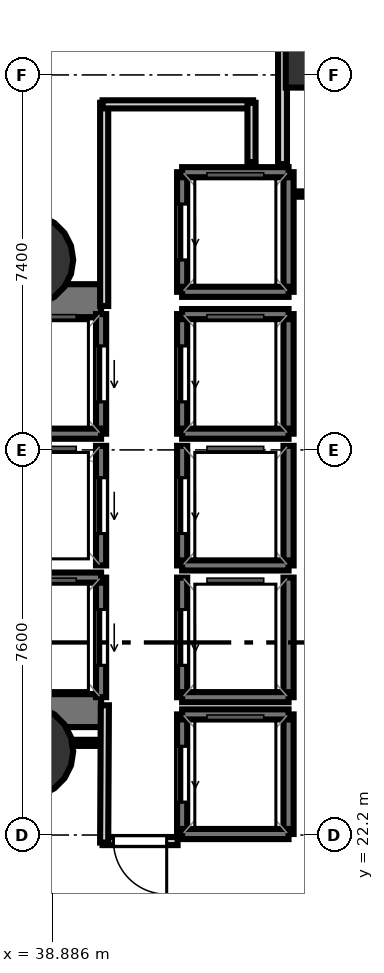
"""IFC4 building model, lengths in metres.
Left out: names, types, materials, properties, quantities, classifications, styles, units other than length and angle.
Written with IfcOpenShell. Run it as: python <this file> out.ifc"""

import sys

from ifc_helpers import new_model, si_unit, direction, frame, frame_2d, origin, origin_2d, place, context, subcontext, project, spatial, rectangle, hollow_circle, extrude, element, fill, save


model = new_model("IFC4")
c1 = context("Model", 3, precision=1e-05, world=origin(), true_north=direction((0.0, 1.0)))
c2 = subcontext(c1, "Body", "Model", "MODEL_VIEW")
j1 = project(units=[si_unit("LENGTHUNIT", "METRE"), si_unit("PLANEANGLEUNIT", "RADIAN")], contexts=[c1])
p1 = place(None, origin())
s1 = spatial("IfcSite", under=j1, at=p1, CompositionType="ELEMENT")
p2 = place(p1, origin())
s2 = spatial("IfcBuilding", under=s1, at=p2, CompositionType="ELEMENT")
p3 = place(p2, origin())
s3 = spatial("IfcBuildingStorey", under=s2, at=p3, CompositionType="ELEMENT", Elevation=0.0)
p4 = place(p3, frame((29.13, 32.745, 0.0), z_axis=(0.0, 0.0, 1.0), x_axis=(1.0, 0.0, 0.0)))
e1 = element("IfcWall", 1, at=p4, inside=s3, PredefinedType="SHEAR", context=c2, shape_type="SweptSolid", body=[
    extrude(rectangle(XDim=10.72, YDim=0.65, at=frame_2d((5.36, 0.0))), origin(), (0.0, 0.0, 1.0), 5.78),
])
p5 = place(p4, frame((1.095, 0.0, 0.0)))
e2 = element("IfcOpeningElement", 2, at=p5, cuts=e1, PredefinedType="OPENING", context=c2, shape_type="SweptSolid", body=[
    extrude(rectangle(XDim=1.25, YDim=2.15, at=frame_2d((0.625, 1.075))), frame((0.0, 0.335, 0.0), z_axis=(0.0, -1.0, 0.0), x_axis=(1.0, 0.0, 0.0)), (0.0, 0.0, 1.0), 0.67),
])
p6 = place(p3, frame((29.13, 24.655, 0.0), z_axis=(0.0, 0.0, 1.0), x_axis=(1.0, 0.0, 0.0)))
e3 = element("IfcWall", 3, at=p6, inside=s3, PredefinedType="SHEAR", context=c2, shape_type="SweptSolid", body=[
    extrude(rectangle(XDim=10.72, YDim=0.65, at=frame_2d((5.36, 0.0))), origin(), (0.0, 0.0, 1.0), 5.78),
])
p7 = place(p6, frame((0.895, 0.0, 0.0)))
e4 = element("IfcOpeningElement", 4, at=p7, cuts=e3, PredefinedType="OPENING", context=c2, shape_type="SweptSolid", body=[
    extrude(rectangle(XDim=1.25, YDim=2.15, at=frame_2d((0.625, 1.075))), frame((0.0, 0.335, 0.0), z_axis=(0.0, -1.0, 0.0), x_axis=(1.0, 0.0, 0.0)), (0.0, 0.0, 1.0), 0.67),
])
for number, where, z_axis, x_axis in (
    (5, (38.4, 33.55, 0.0), (0.0, 0.0, 1.0), (1.0, 0.0, 0.0)),
    (6, (38.4, 23.85, 0.0), (0.0, 0.0, 1.0), (1.0, 0.0, 0.0)),
):
    element("IfcColumn", number, at=place(p3, frame(where, z_axis=z_axis, x_axis=x_axis)), inside=s3, PredefinedType="COLUMN", context=c2, shape_type="SweptSolid", body=[
        extrude(hollow_circle(Radius=0.9, WallThickness=0.045, at=origin_2d()), origin(), (0.0, 0.0, 1.0), 6.0),
    ])
p8 = place(p3, frame((44.045, 37.5, 0.0), z_axis=(0.0, 0.0, 1.0), x_axis=(1.0, 0.0, 0.0)))
e7 = element("IfcColumn", 7, at=p8, inside=s3, PredefinedType="COLUMN", context=c2, shape_type="SweptSolid", body=[
    extrude(rectangle(XDim=1.1, YDim=1.1, at=origin_2d()), origin(), (0.0, 0.0, 1.0), 6.0),
])
p9 = place(p3, frame((39.85, 30.12, 0.0), z_axis=(0.0, 0.0, 1.0), x_axis=(0.0, 1.0, 0.0)))
e8 = element("IfcWall", 8, at=p9, inside=s3, PredefinedType="SOLIDWALL", context=c2, shape_type="SweptSolid", body=[
    extrude(rectangle(XDim=2.36, YDim=0.2, at=frame_2d((1.18, 0.0))), origin(), (0.0, 0.0, 1.0), 5.78),
])
p10 = place(p9, frame((0.63, 0.0, 0.0)))
e9 = element("IfcOpeningElement", 9, at=p10, cuts=e8, PredefinedType="OPENING", context=c2, shape_type="SweptSolid", body=[
    extrude(rectangle(XDim=1.1, YDim=2.15, at=frame_2d((0.55, 1.075))), frame((0.0, 0.11, 0.0), z_axis=(0.0, -1.0, 0.0), x_axis=(1.0, 0.0, 0.0)), (0.0, 0.0, 1.0), 0.22),
])
p11 = place(p3, frame((37.75, 30.12, 0.0), z_axis=(0.0, 0.0, 1.0), x_axis=(1.0, 0.0, 0.0)))
e10 = element("IfcWall", 10, at=p11, inside=s3, PredefinedType="SOLIDWALL", context=c2, shape_type="SweptSolid", body=[
    extrude(rectangle(XDim=2.1, YDim=0.2, at=frame_2d((1.05, 0.0))), origin(), (0.0, 0.0, 1.0), 5.78),
])
p12 = place(p3, frame((39.85, 24.92, 0.0), z_axis=(0.0, 0.0, 1.0), x_axis=(0.0, 1.0, 0.0)))
e11 = element("IfcWall", 11, at=p12, inside=s3, PredefinedType="SOLIDWALL", context=c2, shape_type="SweptSolid", body=[
    extrude(rectangle(XDim=2.36, YDim=0.2, at=frame_2d((1.18, 0.0))), origin(), (0.0, 0.0, 1.0), 5.78),
])
p13 = place(p12, frame((0.63, 0.0, 0.0)))
e12 = element("IfcOpeningElement", 12, at=p13, cuts=e11, PredefinedType="OPENING", context=c2, shape_type="SweptSolid", body=[
    extrude(rectangle(XDim=1.1, YDim=2.15, at=frame_2d((0.55, 1.075))), frame((0.0, 0.11, 0.0), z_axis=(0.0, -1.0, 0.0), x_axis=(1.0, 0.0, 0.0)), (0.0, 0.0, 1.0), 0.22),
])
p14 = place(p3, frame((37.75, 27.28, 0.0), z_axis=(0.0, 0.0, 1.0), x_axis=(1.0, 0.0, 0.0)))
e13 = element("IfcWall", 13, at=p14, inside=s3, PredefinedType="SOLIDWALL", context=c2, shape_type="SweptSolid", body=[
    extrude(rectangle(XDim=2.1, YDim=0.2, at=frame_2d((1.05, 0.0))), origin(), (0.0, 0.0, 1.0), 5.78),
])
p15 = place(p3, frame((43.55, 30.12, 0.0), z_axis=(0.0, 0.0, 1.0), x_axis=(0.0, 1.0, 0.0)))
e14 = element("IfcWall", 14, at=p15, inside=s3, PredefinedType="SOLIDWALL", context=c2, shape_type="SweptSolid", body=[
    extrude(rectangle(XDim=2.36, YDim=0.2, at=frame_2d((1.18, 0.0))), origin(), (0.0, 0.0, 1.0), 5.78),
])
p16 = place(p3, frame((41.45, 30.12, 0.0), z_axis=(0.0, 0.0, 1.0), x_axis=(0.0, 1.0, 0.0)))
e15 = element("IfcWall", 15, at=p16, inside=s3, PredefinedType="SOLIDWALL", context=c2, shape_type="SweptSolid", body=[
    extrude(rectangle(XDim=2.36, YDim=0.2, at=frame_2d((1.18, 0.0))), origin(), (0.0, 0.0, 1.0), 5.78),
])
p17 = place(p16, frame((0.63, 0.0, 0.0)))
e16 = element("IfcOpeningElement", 16, at=p17, cuts=e15, PredefinedType="OPENING", context=c2, shape_type="SweptSolid", body=[
    extrude(rectangle(XDim=1.1, YDim=2.15, at=frame_2d((0.55, 1.075))), frame((0.0, 0.11, 0.0), z_axis=(0.0, -1.0, 0.0), x_axis=(1.0, 0.0, 0.0)), (0.0, 0.0, 1.0), 0.22),
])
for number, where, z_axis, x_axis in (
    (17, (41.45, 32.48, 0.0), (0.0, 0.0, 1.0), (1.0, 0.0, 0.0)),
    (18, (41.45, 30.12, 0.0), (0.0, 0.0, 1.0), (1.0, 0.0, 0.0)),
):
    element("IfcWall", number, at=place(p3, frame(where, z_axis=z_axis, x_axis=x_axis)), inside=s3, PredefinedType="SOLIDWALL", context=c2, shape_type="SweptSolid", body=[
        extrude(rectangle(XDim=2.1, YDim=0.2, at=frame_2d((1.05, 0.0))), origin(), (0.0, 0.0, 1.0), 5.78),
    ])
p18 = place(p3, frame((43.55, 27.52, 0.0), z_axis=(0.0, 0.0, 1.0), x_axis=(0.0, 1.0, 0.0)))
e19 = element("IfcWall", 19, at=p18, inside=s3, PredefinedType="SOLIDWALL", context=c2, shape_type="SweptSolid", body=[
    extrude(rectangle(XDim=2.36, YDim=0.2, at=frame_2d((1.18, 0.0))), origin(), (0.0, 0.0, 1.0), 5.78),
])
p19 = place(p3, frame((41.45, 27.52, 0.0), z_axis=(0.0, 0.0, 1.0), x_axis=(0.0, 1.0, 0.0)))
e20 = element("IfcWall", 20, at=p19, inside=s3, PredefinedType="SOLIDWALL", context=c2, shape_type="SweptSolid", body=[
    extrude(rectangle(XDim=2.36, YDim=0.2, at=frame_2d((1.18, 0.0))), origin(), (0.0, 0.0, 1.0), 5.78),
])
p20 = place(p19, frame((0.63, 0.0, 0.0)))
e21 = element("IfcOpeningElement", 21, at=p20, cuts=e20, PredefinedType="OPENING", context=c2, shape_type="SweptSolid", body=[
    extrude(rectangle(XDim=1.1, YDim=2.15, at=frame_2d((0.55, 1.075))), frame((0.0, 0.11, 0.0), z_axis=(0.0, -1.0, 0.0), x_axis=(1.0, 0.0, 0.0)), (0.0, 0.0, 1.0), 0.22),
])
p21 = place(p3, frame((41.45, 27.52, 0.0), z_axis=(0.0, 0.0, 1.0), x_axis=(1.0, 0.0, 0.0)))
e22 = element("IfcWall", 22, at=p21, inside=s3, PredefinedType="SOLIDWALL", context=c2, shape_type="SweptSolid", body=[
    extrude(rectangle(XDim=2.1, YDim=0.2, at=frame_2d((1.05, 0.0))), origin(), (0.0, 0.0, 1.0), 5.78),
])
p22 = place(p3, frame((43.55, 24.92, 0.0), z_axis=(0.0, 0.0, 1.0), x_axis=(0.0, 1.0, 0.0)))
e23 = element("IfcWall", 23, at=p22, inside=s3, PredefinedType="SOLIDWALL", context=c2, shape_type="SweptSolid", body=[
    extrude(rectangle(XDim=2.36, YDim=0.2, at=frame_2d((1.18, 0.0))), origin(), (0.0, 0.0, 1.0), 5.78),
])
p23 = place(p3, frame((41.45, 24.92, 0.0), z_axis=(0.0, 0.0, 1.0), x_axis=(0.0, 1.0, 0.0)))
e24 = element("IfcWall", 24, at=p23, inside=s3, PredefinedType="SOLIDWALL", context=c2, shape_type="SweptSolid", body=[
    extrude(rectangle(XDim=2.36, YDim=0.2, at=frame_2d((1.18, 0.0))), origin(), (0.0, 0.0, 1.0), 5.78),
])
p24 = place(p23, frame((0.63, 0.0, 0.0)))
e25 = element("IfcOpeningElement", 25, at=p24, cuts=e24, PredefinedType="OPENING", context=c2, shape_type="SweptSolid", body=[
    extrude(rectangle(XDim=1.1, YDim=2.15, at=frame_2d((0.55, 1.075))), frame((0.0, 0.11, 0.0), z_axis=(0.0, -1.0, 0.0), x_axis=(1.0, 0.0, 0.0)), (0.0, 0.0, 1.0), 0.22),
])
p25 = place(p3, frame((41.45, 24.92, 0.0), z_axis=(0.0, 0.0, 1.0), x_axis=(1.0, 0.0, 0.0)))
e26 = element("IfcWall", 26, at=p25, inside=s3, PredefinedType="SOLIDWALL", context=c2, shape_type="SweptSolid", body=[
    extrude(rectangle(XDim=2.1, YDim=0.2, at=frame_2d((1.05, 0.0))), origin(), (0.0, 0.0, 1.0), 5.78),
])
p26 = place(p3, frame((39.85, 27.52, 0.0), z_axis=(0.0, 0.0, 1.0), x_axis=(0.0, 1.0, 0.0)))
e27 = element("IfcWall", 27, at=p26, inside=s3, PredefinedType="SOLIDWALL", context=c2, shape_type="SweptSolid", body=[
    extrude(rectangle(XDim=2.36, YDim=0.2, at=frame_2d((1.18, 0.0))), origin(), (0.0, 0.0, 1.0), 5.78),
])
p27 = place(p26, frame((0.63, 0.0, 0.0)))
e28 = element("IfcOpeningElement", 28, at=p27, cuts=e27, PredefinedType="OPENING", context=c2, shape_type="SweptSolid", body=[
    extrude(rectangle(XDim=1.1, YDim=2.15, at=frame_2d((0.55, 1.075))), frame((0.0, 0.11, 0.0), z_axis=(0.0, -1.0, 0.0), x_axis=(1.0, 0.0, 0.0)), (0.0, 0.0, 1.0), 0.22),
])
p28 = place(p3, frame((43.55, 22.22, 0.0), z_axis=(0.0, 0.0, 1.0), x_axis=(0.0, 1.0, 0.0)))
e29 = element("IfcWall", 29, at=p28, inside=s3, PredefinedType="SOLIDWALL", context=c2, shape_type="SweptSolid", body=[
    extrude(rectangle(XDim=2.36, YDim=0.2, at=frame_2d((1.18, 0.0))), origin(), (0.0, 0.0, 1.0), 5.78),
])
p29 = place(p3, frame((41.45, 22.22, 0.0), z_axis=(0.0, 0.0, 1.0), x_axis=(0.0, 1.0, 0.0)))
e30 = element("IfcWall", 30, at=p29, inside=s3, PredefinedType="SOLIDWALL", context=c2, shape_type="SweptSolid", body=[
    extrude(rectangle(XDim=2.36, YDim=0.2, at=frame_2d((1.18, 0.0))), origin(), (0.0, 0.0, 1.0), 5.78),
])
p30 = place(p29, frame((0.63, 0.0, 0.0)))
e31 = element("IfcOpeningElement", 31, at=p30, cuts=e30, PredefinedType="OPENING", context=c2, shape_type="SweptSolid", body=[
    extrude(rectangle(XDim=1.1, YDim=2.15, at=frame_2d((0.55, 1.075))), frame((0.0, 0.11, 0.0), z_axis=(0.0, -1.0, 0.0), x_axis=(1.0, 0.0, 0.0)), (0.0, 0.0, 1.0), 0.22),
])
for number, where, z_axis, x_axis in (
    (32, (41.45, 24.58, 0.0), (0.0, 0.0, 1.0), (1.0, 0.0, 0.0)),
    (33, (41.45, 22.22, 0.0), (0.0, 0.0, 1.0), (1.0, 0.0, 0.0)),
):
    element("IfcWall", number, at=place(p3, frame(where, z_axis=z_axis, x_axis=x_axis)), inside=s3, PredefinedType="SOLIDWALL", context=c2, shape_type="SweptSolid", body=[
        extrude(rectangle(XDim=2.1, YDim=0.2, at=frame_2d((1.05, 0.0))), origin(), (0.0, 0.0, 1.0), 5.78),
    ])
p31 = place(p3, frame((43.55, 32.92, 0.0), z_axis=(0.0, 0.0, 1.0), x_axis=(0.0, 1.0, 0.0)))
e34 = element("IfcWall", 34, at=p31, inside=s3, PredefinedType="SOLIDWALL", context=c2, shape_type="SweptSolid", body=[
    extrude(rectangle(XDim=2.36, YDim=0.2, at=frame_2d((1.18, 0.0))), origin(), (0.0, 0.0, 1.0), 5.78),
])
p32 = place(p3, frame((41.45, 32.92, 0.0), z_axis=(0.0, 0.0, 1.0), x_axis=(0.0, 1.0, 0.0)))
e35 = element("IfcWall", 35, at=p32, inside=s3, PredefinedType="SOLIDWALL", context=c2, shape_type="SweptSolid", body=[
    extrude(rectangle(XDim=2.36, YDim=0.2, at=frame_2d((1.18, 0.0))), origin(), (0.0, 0.0, 1.0), 5.78),
])
p33 = place(p32, frame((0.63, 0.0, 0.0)))
e36 = element("IfcOpeningElement", 36, at=p33, cuts=e35, PredefinedType="OPENING", context=c2, shape_type="SweptSolid", body=[
    extrude(rectangle(XDim=1.1, YDim=2.15, at=frame_2d((0.55, 1.075))), frame((0.0, 0.11, 0.0), z_axis=(0.0, -1.0, 0.0), x_axis=(1.0, 0.0, 0.0)), (0.0, 0.0, 1.0), 0.22),
])
for number, where, z_axis, x_axis in (
    (37, (41.45, 35.28, 0.0), (0.0, 0.0, 1.0), (1.0, 0.0, 0.0)),
    (38, (41.45, 32.92, 0.0), (0.0, 0.0, 1.0), (1.0, 0.0, 0.0)),
):
    element("IfcWall", number, at=place(p3, frame(where, z_axis=z_axis, x_axis=x_axis)), inside=s3, PredefinedType="SOLIDWALL", context=c2, shape_type="SweptSolid", body=[
        extrude(rectangle(XDim=2.1, YDim=0.2, at=frame_2d((1.05, 0.0))), origin(), (0.0, 0.0, 1.0), 5.78),
    ])
p34 = place(p3, frame((39.911, 32.64, 0.0), z_axis=(0.0, 0.0, 1.0), x_axis=(0.0, 1.0, 0.0)))
e39 = element("IfcWall", 39, at=p34, inside=s3, PredefinedType="PARTITIONING", context=c2, shape_type="SweptSolid", body=[
    extrude(rectangle(XDim=4.01, YDim=0.16, at=frame_2d((2.005, 0.0))), origin(), (0.0, 0.0, 1.0), 5.1),
])
p35 = place(p3, frame((39.88, 36.619, 0.0), z_axis=(0.0, 0.0, 1.0), x_axis=(1.0, 0.0, 0.0)))
e40 = element("IfcWall", 40, at=p35, inside=s3, PredefinedType="PARTITIONING", context=c2, shape_type="SweptSolid", body=[
    extrude(rectangle(XDim=2.97, YDim=0.16, at=frame_2d((1.485, 0.0))), origin(), (0.0, 0.0, 1.0), 5.1),
])
p36 = place(p3, frame((42.819, 36.65, 0.0), z_axis=(0.0, 0.0, 1.0), x_axis=(0.0, -1.0, 0.0)))
e41 = element("IfcWall", 41, at=p36, inside=s3, PredefinedType="PARTITIONING", context=c2, shape_type="SweptSolid", body=[
    extrude(rectangle(XDim=1.17, YDim=0.16, at=frame_2d((0.585, 0.0))), origin(), (0.0, 0.0, 1.0), 5.1),
])
p37 = place(p3, frame((41.36, 22.081, 0.0), z_axis=(0.0, 0.0, 1.0), x_axis=(-1.0, 0.0, 0.0)))
e42 = element("IfcWall", 42, at=p37, inside=s3, PredefinedType="PARTITIONING", context=c2, shape_type="SweptSolid", body=[
    extrude(rectangle(XDim=1.48, YDim=0.16, at=frame_2d((0.74, 0.0))), origin(), (0.0, 0.0, 1.0), 5.1),
])
p38 = place(p37, frame((0.215, 0.0, 0.0)))
e43 = element("IfcOpeningElement", 43, at=p38, cuts=e42, PredefinedType="OPENING", context=c2, shape_type="SweptSolid", body=[
    extrude(rectangle(XDim=1.05, YDim=2.15, at=frame_2d((0.525, 1.075))), frame((0.0, 0.09, 0.0), z_axis=(0.0, -1.0, 0.0), x_axis=(1.0, 0.0, 0.0)), (0.0, 0.0, 1.0), 0.18),
])
p39 = place(p3, frame((39.911, 22.05, 0.0), z_axis=(0.0, 0.0, 1.0), x_axis=(0.005133679986, 0.999986822578, 0.0)))
e44 = element("IfcWall", 44, at=p39, inside=s3, PredefinedType="PARTITIONING", context=c2, shape_type="SweptSolid", body=[
    extrude(rectangle(XDim=2.711, YDim=0.16, at=frame_2d((1.355, 0.0))), origin(), (0.0, 0.0, 1.0), 5.1),
])
p40 = place(p3, frame((33.512, 24.019, 0.0), z_axis=(0.0, 0.0, 1.0), x_axis=(1.0, 0.0, 0.0)))
e45 = element("IfcWall", 45, at=p40, inside=s3, PredefinedType="PARTITIONING", context=c2, shape_type="SweptSolid", body=[
    extrude(rectangle(XDim=6.308, YDim=0.12, at=frame_2d((3.154, 0.0))), origin(), (0.0, 0.0, 1.0), 5.1),
])
p41 = place(p3, frame((43.72, 34.849, 0.0), z_axis=(0.0, 0.0, 1.0), x_axis=(1.0, 0.0, 0.0)))
e46 = element("IfcWall", 46, at=p41, inside=s3, PredefinedType="PARTITIONING", context=c2, shape_type="SweptSolid", body=[
    extrude(rectangle(XDim=10.08, YDim=0.105, at=frame_2d((5.04, 0.0))), origin(), (0.0, 0.0, 1.0), 5.1),
])
p42 = place(p41, frame((2.79, 0.0, 0.0)))
e47 = element("IfcOpeningElement", 47, at=p42, cuts=e46, PredefinedType="OPENING", context=c2, shape_type="SweptSolid", body=[
    extrude(rectangle(XDim=0.86, YDim=2.05, at=frame_2d((0.43, 1.025))), frame((0.0, 0.062, 0.0), z_axis=(0.0, -1.0, 0.0), x_axis=(1.0, 0.0, 0.0)), (0.0, 0.0, 1.0), 0.125),
])
p43 = place(p3, frame((43.431, 35.44, 0.0), z_axis=(0.0, 0.0, 1.0), x_axis=(0.0, 1.0, 0.0)))
e48 = element("IfcWall", 48, at=p43, inside=s3, PredefinedType="PLUMBINGWALL", context=c2, shape_type="SweptSolid", body=[
    extrude(rectangle(XDim=13.06, YDim=0.175, at=frame_2d((6.53, 0.0))), origin(), (0.0, 0.0, 1.0), 5.1),
])
p44 = place(p10, origin())
e49 = element("IfcDoor", 49, at=p44, inside=s3, OperationType="SLIDING_TO_LEFT", PredefinedType="DOOR", context=c2, shape_type="SweptSolid", body=[
    extrude(rectangle(XDim=1.1, YDim=2.15, at=frame_2d((0.55, 1.075))), frame((0.0, 0.025, 0.0), z_axis=(0.0, -1.0, 0.0), x_axis=(1.0, 0.0, 0.0)), (0.0, 0.0, 1.0), 0.05),
])
fill(e9, e49)
p45 = place(p13, origin())
e50 = element("IfcDoor", 50, at=p45, inside=s3, OperationType="SLIDING_TO_LEFT", PredefinedType="DOOR", context=c2, shape_type="SweptSolid", body=[
    extrude(rectangle(XDim=1.1, YDim=2.15, at=frame_2d((0.55, 1.075))), frame((0.0, 0.025, 0.0), z_axis=(0.0, -1.0, 0.0), x_axis=(1.0, 0.0, 0.0)), (0.0, 0.0, 1.0), 0.05),
])
fill(e12, e50)
p46 = place(p17, origin())
e51 = element("IfcDoor", 51, at=p46, inside=s3, OperationType="SLIDING_TO_LEFT", PredefinedType="DOOR", context=c2, shape_type="SweptSolid", body=[
    extrude(rectangle(XDim=1.1, YDim=2.15, at=frame_2d((0.55, 1.075))), frame((0.0, 0.025, 0.0), z_axis=(0.0, -1.0, 0.0), x_axis=(1.0, 0.0, 0.0)), (0.0, 0.0, 1.0), 0.05),
])
fill(e16, e51)
p47 = place(p20, origin())
e52 = element("IfcDoor", 52, at=p47, inside=s3, OperationType="SLIDING_TO_LEFT", PredefinedType="DOOR", context=c2, shape_type="SweptSolid", body=[
    extrude(rectangle(XDim=1.1, YDim=2.15, at=frame_2d((0.55, 1.075))), frame((0.0, 0.025, 0.0), z_axis=(0.0, -1.0, 0.0), x_axis=(1.0, 0.0, 0.0)), (0.0, 0.0, 1.0), 0.05),
])
fill(e21, e52)
p48 = place(p24, origin())
e53 = element("IfcDoor", 53, at=p48, inside=s3, OperationType="SLIDING_TO_LEFT", PredefinedType="DOOR", context=c2, shape_type="SweptSolid", body=[
    extrude(rectangle(XDim=1.1, YDim=2.15, at=frame_2d((0.55, 1.075))), frame((0.0, 0.025, 0.0), z_axis=(0.0, -1.0, 0.0), x_axis=(1.0, 0.0, 0.0)), (0.0, 0.0, 1.0), 0.05),
])
fill(e25, e53)
p49 = place(p27, origin())
e54 = element("IfcDoor", 54, at=p49, inside=s3, OperationType="SLIDING_TO_LEFT", PredefinedType="DOOR", context=c2, shape_type="SweptSolid", body=[
    extrude(rectangle(XDim=1.1, YDim=2.15, at=frame_2d((0.55, 1.075))), frame((0.0, 0.025, 0.0), z_axis=(0.0, -1.0, 0.0), x_axis=(1.0, 0.0, 0.0)), (0.0, 0.0, 1.0), 0.05),
])
fill(e28, e54)
p50 = place(p30, origin())
e55 = element("IfcDoor", 55, at=p50, inside=s3, OperationType="SLIDING_TO_LEFT", PredefinedType="DOOR", context=c2, shape_type="SweptSolid", body=[
    extrude(rectangle(XDim=1.1, YDim=2.15, at=frame_2d((0.55, 1.075))), frame((0.0, 0.025, 0.0), z_axis=(0.0, -1.0, 0.0), x_axis=(1.0, 0.0, 0.0)), (0.0, 0.0, 1.0), 0.05),
])
fill(e31, e55)
p51 = place(p33, origin())
e56 = element("IfcDoor", 56, at=p51, inside=s3, OperationType="SLIDING_TO_LEFT", PredefinedType="DOOR", context=c2, shape_type="SweptSolid", body=[
    extrude(rectangle(XDim=1.1, YDim=2.15, at=frame_2d((0.55, 1.075))), frame((0.0, 0.025, 0.0), z_axis=(0.0, -1.0, 0.0), x_axis=(1.0, 0.0, 0.0)), (0.0, 0.0, 1.0), 0.05),
])
fill(e36, e56)
p52 = place(p38, origin())
e57 = element("IfcDoor", 57, at=p52, inside=s3, OperationType="SINGLE_SWING_LEFT", PredefinedType="DOOR", context=c2, shape_type="SweptSolid", body=[
    extrude(rectangle(XDim=1.05, YDim=2.15, at=frame_2d((0.525, 1.075))), frame((0.0, 0.025, 0.0), z_axis=(0.0, -1.0, 0.0), x_axis=(1.0, 0.0, 0.0)), (0.0, 0.0, 1.0), 0.05),
])
fill(e43, e57)
save(model, sys.argv[1])
